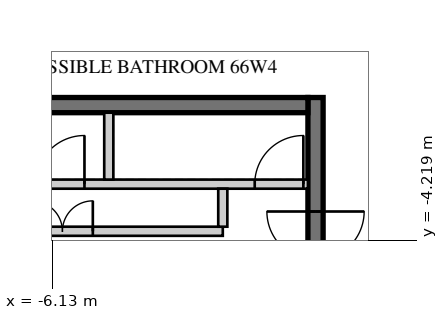
"""IFC4 building model, lengths in metres.
Left out: names, types, materials, properties, quantities, classifications, styles, units other than length and angle.
Written with IfcOpenShell. Run it as: python <this file> out.ifc"""

import sys

from ifc_helpers import new_model, si_unit, direction, frame, frame_2d, origin, place, context, subcontext, project, spatial, rectangle, extrude, element, fill, save


model = new_model("IFC4")
c1 = context("Model", 3, precision=1e-05, world=origin(), true_north=direction((0.0, 1.0)))
c2 = subcontext(c1, "Body", "Model", "MODEL_VIEW")
j1 = project(units=[si_unit("LENGTHUNIT", "METRE"), si_unit("PLANEANGLEUNIT", "RADIAN")], contexts=[c1])
p1 = place(None, origin())
s1 = spatial("IfcSite", under=j1, at=p1, CompositionType="ELEMENT")
p2 = place(p1, origin())
s2 = spatial("IfcBuilding", under=s1, at=p2, CompositionType="ELEMENT")
p3 = place(p2, frame((0.0, 0.0, 257.7)))
s3 = spatial("IfcBuildingStorey", under=s2, at=p3, CompositionType="ELEMENT", Elevation=257.7)
p4 = place(p3, frame((-1.8, -1.875, 0.0), z_axis=(0.0, 0.0, 1.0), x_axis=(0.0, -1.0, 0.0)))
e1 = element("IfcWall", 1, at=p4, inside=s3, PredefinedType="SHEAR", context=c2, shape_type="SweptSolid", body=[
    extrude(rectangle(XDim=6.725, YDim=0.25, at=frame_2d((3.363, 0.0))), origin(), (0.0, 0.0, 1.0), 3.4),
])
p5 = place(p4, frame((1.875, 0.0, 0.0)))
e2 = element("IfcOpeningElement", 2, at=p5, cuts=e1, PredefinedType="OPENING", context=c2, shape_type="SweptSolid", body=[
    extrude(rectangle(XDim=1.6, YDim=2.4, at=frame_2d((0.8, 1.2))), frame((0.0, 0.135, 0.0), z_axis=(0.0, -1.0, 0.0), x_axis=(1.0, 0.0, 0.0)), (0.0, 0.0, 1.0), 0.27),
])
p6 = place(p3, frame((-1.925, -2.0, 0.0), z_axis=(0.0, 0.0, 1.0), x_axis=(-1.0, 0.0, 0.0)))
e3 = element("IfcWall", 3, at=p6, inside=s3, PredefinedType="SHEAR", context=c2, shape_type="SweptSolid", body=[
    extrude(rectangle(XDim=6.675, YDim=0.25, at=frame_2d((3.337, 0.0))), origin(), (0.0, 0.0, 1.0), 3.4),
])
p7 = place(p3, frame((-1.925, -3.3, 0.0), z_axis=(0.0, 0.0, 1.0), x_axis=(-1.0, 0.0, 0.0)))
e4 = element("IfcWall", 4, at=p7, inside=s3, PredefinedType="PARTITIONING", context=c2, shape_type="SweptSolid", body=[
    extrude(rectangle(XDim=6.675, YDim=0.15, at=frame_2d((3.337, 0.0))), origin(), (0.0, 0.0, 1.0), 3.4),
])
p8 = place(p7, frame((0.075, 0.0, 0.0)))
e5 = element("IfcOpeningElement", 5, at=p8, cuts=e4, PredefinedType="OPENING", context=c2, shape_type="SweptSolid", body=[
    extrude(rectangle(XDim=0.8, YDim=2.1, at=frame_2d((0.4, 1.05))), frame((0.0, 0.085, 0.0), z_axis=(0.0, -1.0, 0.0), x_axis=(1.0, 0.0, 0.0)), (0.0, 0.0, 1.0), 0.17),
])
p9 = place(p7, frame((3.675, 0.0, 0.0)))
e6 = element("IfcOpeningElement", 6, at=p9, cuts=e4, PredefinedType="OPENING", context=c2, shape_type="SweptSolid", body=[
    extrude(rectangle(XDim=0.8, YDim=2.1, at=frame_2d((0.4, 1.05))), frame((0.0, 0.085, 0.0), z_axis=(0.0, -1.0, 0.0), x_axis=(1.0, 0.0, 0.0)), (0.0, 0.0, 1.0), 0.17),
])
p10 = place(p3, frame((-5.2, -2.125, 0.0), z_axis=(0.0, 0.0, 1.0), x_axis=(0.0, -1.0, 0.0)))
e7 = element("IfcWall", 7, at=p10, inside=s3, PredefinedType="PARTITIONING", context=c2, shape_type="SweptSolid", body=[
    extrude(rectangle(XDim=1.1, YDim=0.15, at=frame_2d((0.55, 0.0))), origin(), (0.0, 0.0, 1.0), 3.4),
])
p11 = place(p3, frame((-3.325, -4.075, 0.0), z_axis=(0.0, 0.0, 1.0), x_axis=(-1.0, 0.0, 0.0)))
e8 = element("IfcWall", 8, at=p11, inside=s3, PredefinedType="PARTITIONING", context=c2, shape_type="SweptSolid", body=[
    extrude(rectangle(XDim=5.275, YDim=0.15, at=frame_2d((2.638, 0.0))), origin(), (0.0, 0.0, 1.0), 3.22),
])
p12 = place(p11, frame((2.137, 0.0, 0.0)))
e9 = element("IfcOpeningElement", 9, at=p12, cuts=e8, PredefinedType="OPENING", context=c2, shape_type="SweptSolid", body=[
    extrude(rectangle(XDim=1.0, YDim=2.1, at=frame_2d((0.5, 1.05))), frame((0.0, 0.085, 0.0), z_axis=(0.0, -1.0, 0.0), x_axis=(1.0, 0.0, 0.0)), (0.0, 0.0, 1.0), 0.17),
])
p13 = place(p3, frame((-3.325, -3.375, 0.0), z_axis=(0.0, 0.0, 1.0), x_axis=(0.0, -1.0, 0.0)))
e10 = element("IfcWall", 10, at=p13, inside=s3, PredefinedType="PARTITIONING", context=c2, shape_type="SweptSolid", body=[
    extrude(rectangle(XDim=0.625, YDim=0.15, at=frame_2d((0.312, 0.0))), origin(), (0.0, 0.0, 1.0), 3.22),
])
p14 = place(p12, frame((1.0, 0.0, 0.0), z_axis=(0.0, 0.0, 1.0), x_axis=(-1.0, 0.0, 0.0)))
e11 = element("IfcDoor", 11, at=p14, inside=s3, OperationType="DOUBLE_DOOR_SINGLE_SWING", PredefinedType="DOOR", context=c2, shape_type="SweptSolid", body=[
    extrude(rectangle(XDim=1.0, YDim=2.1, at=frame_2d((0.5, 1.05))), frame((0.0, 0.025, 0.0), z_axis=(0.0, -1.0, 0.0), x_axis=(1.0, 0.0, 0.0)), (0.0, 0.0, 1.0), 0.05),
])
fill(e9, e11)
p15 = place(p5, origin())
e12 = element("IfcDoor", 12, at=p15, inside=s3, OperationType="DOUBLE_DOOR_DOUBLE_SWING", PredefinedType="DOOR", context=c2, shape_type="SweptSolid", body=[
    extrude(rectangle(XDim=1.6, YDim=2.4, at=frame_2d((0.8, 1.2))), frame((0.0, 0.025, 0.0), z_axis=(0.0, -1.0, 0.0), x_axis=(1.0, 0.0, 0.0)), (0.0, 0.0, 1.0), 0.05),
])
fill(e2, e12)
p16 = place(p8, frame((0.8, 0.0, 0.0), z_axis=(0.0, 0.0, 1.0), x_axis=(-1.0, 0.0, 0.0)))
e13 = element("IfcDoor", 13, at=p16, inside=s3, OperationType="SINGLE_SWING_RIGHT", PredefinedType="DOOR", context=c2, shape_type="SweptSolid", body=[
    extrude(rectangle(XDim=0.8, YDim=2.1, at=frame_2d((0.4, 1.05))), frame((0.0, 0.025, 0.0), z_axis=(0.0, -1.0, 0.0), x_axis=(1.0, 0.0, 0.0)), (0.0, 0.0, 1.0), 0.05),
])
fill(e5, e13)
p17 = place(p9, frame((0.8, 0.0, 0.0), z_axis=(0.0, 0.0, 1.0), x_axis=(-1.0, 0.0, 0.0)))
e14 = element("IfcDoor", 14, at=p17, inside=s3, OperationType="SINGLE_SWING_RIGHT", PredefinedType="DOOR", context=c2, shape_type="SweptSolid", body=[
    extrude(rectangle(XDim=0.8, YDim=2.1, at=frame_2d((0.4, 1.05))), frame((0.0, 0.025, 0.0), z_axis=(0.0, -1.0, 0.0), x_axis=(1.0, 0.0, 0.0)), (0.0, 0.0, 1.0), 0.05),
])
fill(e6, e14)
save(model, sys.argv[1])
